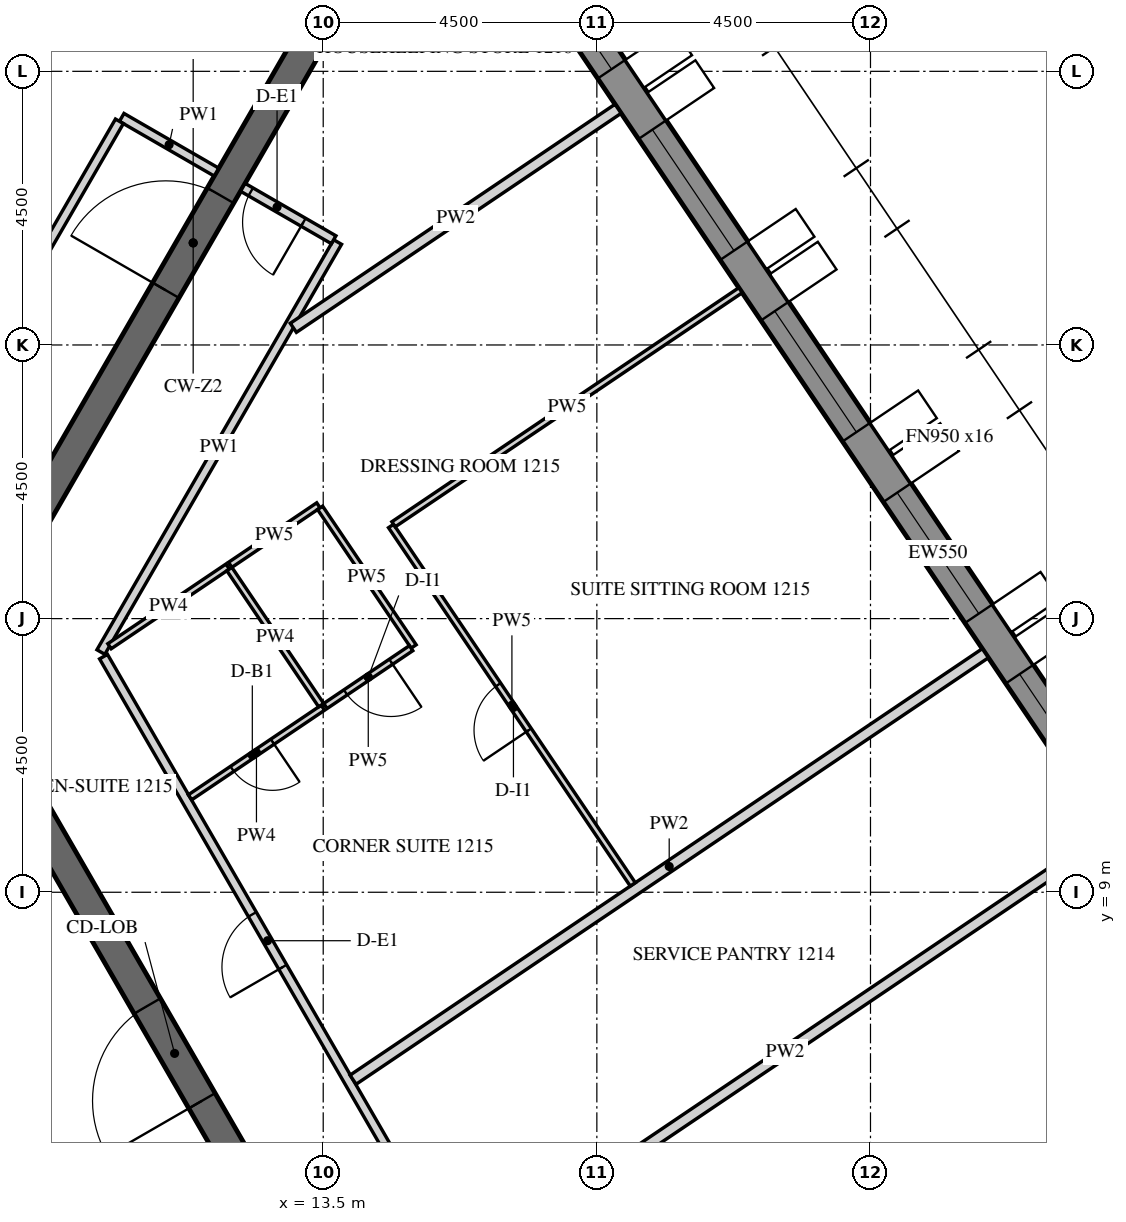
"""IFC4 building model, lengths in metres.
Left out: names, types, materials, properties, quantities, classifications, styles, units other than length and angle.
Written with IfcOpenShell. Run it as: python <this file> out.ifc"""

import sys

from ifc_helpers import new_model, si_unit, direction, frame, frame_2d, origin, place, context, subcontext, project, spatial, polyline, rectangle, outline, extrude, element, fill, save


model = new_model("IFC4")
c1 = context("Model", 3, precision=1e-05, world=origin(), true_north=direction((0.0, 1.0)))
c2 = subcontext(c1, "Body", "Model", "MODEL_VIEW")
j1 = project(units=[si_unit("LENGTHUNIT", "METRE"), si_unit("PLANEANGLEUNIT", "RADIAN")], contexts=[c1])
p1 = place(None, origin())
s1 = spatial("IfcSite", under=j1, at=p1, CompositionType="ELEMENT")
p2 = place(p1, origin())
s2 = spatial("IfcBuilding", under=s1, at=p2, CompositionType="ELEMENT")
p3 = place(p2, frame((0.0, 0.0, 164.4)))
s3 = spatial("IfcBuildingStorey", under=s2, at=p3, CompositionType="ELEMENT", Elevation=164.4)
p4 = place(p3, frame((31.371, 3.071, -0.15), z_axis=(0.0, 0.0, 1.0), x_axis=(-0.559189891278, 0.829039604297, 0.0)))
e1 = element("IfcWall", 1, at=p4, inside=s3, PredefinedType="SOLIDWALL", context=c2, shape_type="SweptSolid", body=[
    extrude(outline(polyline([(-0.026, -0.275), (27.781, -0.275), (27.736, 0.275), (0.026, 0.275), (-0.026, -0.275)])), origin(), (0.0, 0.0, 1.0), 3.9),
])
p5 = place(p4, frame((1.879, 0.0, 1.05)))
e2 = element("IfcOpeningElement", 2, at=p5, cuts=e1, PredefinedType="OPENING", context=c2, shape_type="SweptSolid", body=[
    extrude(rectangle(XDim=2.4, YDim=2.4, at=frame_2d((1.2, 1.2))), frame((0.0, 0.285, 0.0), z_axis=(0.0, -1.0, 0.0), x_axis=(1.0, 0.0, 0.0)), (0.0, 0.0, 1.0), 0.57),
])
p6 = place(p4, frame((5.479, 0.0, 1.05)))
e3 = element("IfcOpeningElement", 3, at=p6, cuts=e1, PredefinedType="OPENING", context=c2, shape_type="SweptSolid", body=[
    extrude(rectangle(XDim=2.4, YDim=2.4, at=frame_2d((1.2, 1.2))), frame((0.0, 0.285, 0.0), z_axis=(0.0, -1.0, 0.0), x_axis=(1.0, 0.0, 0.0)), (0.0, 0.0, 1.0), 0.57),
])
p7 = place(p4, frame((9.079, 0.0, 1.05)))
e4 = element("IfcOpeningElement", 4, at=p7, cuts=e1, PredefinedType="OPENING", context=c2, shape_type="SweptSolid", body=[
    extrude(rectangle(XDim=2.4, YDim=2.4, at=frame_2d((1.2, 1.2))), frame((0.0, 0.285, 0.0), z_axis=(0.0, -1.0, 0.0), x_axis=(1.0, 0.0, 0.0)), (0.0, 0.0, 1.0), 0.57),
])
p8 = place(p4, frame((12.679, 0.0, 1.05)))
e5 = element("IfcOpeningElement", 5, at=p8, cuts=e1, PredefinedType="OPENING", context=c2, shape_type="SweptSolid", body=[
    extrude(rectangle(XDim=2.4, YDim=2.4, at=frame_2d((1.2, 1.2))), frame((0.0, 0.285, 0.0), z_axis=(0.0, -1.0, 0.0), x_axis=(1.0, 0.0, 0.0)), (0.0, 0.0, 1.0), 0.57),
])
p9 = place(p4, frame((16.279, 0.0, 1.05)))
e6 = element("IfcOpeningElement", 6, at=p9, cuts=e1, PredefinedType="OPENING", context=c2, shape_type="SweptSolid", body=[
    extrude(rectangle(XDim=2.4, YDim=2.4, at=frame_2d((1.2, 1.2))), frame((0.0, 0.285, 0.0), z_axis=(0.0, -1.0, 0.0), x_axis=(1.0, 0.0, 0.0)), (0.0, 0.0, 1.0), 0.57),
])
p10 = place(p4, frame((19.879, 0.0, 1.05)))
e7 = element("IfcOpeningElement", 7, at=p10, cuts=e1, PredefinedType="OPENING", context=c2, shape_type="SweptSolid", body=[
    extrude(rectangle(XDim=2.4, YDim=2.4, at=frame_2d((1.2, 1.2))), frame((0.0, 0.285, 0.0), z_axis=(0.0, -1.0, 0.0), x_axis=(1.0, 0.0, 0.0)), (0.0, 0.0, 1.0), 0.57),
])
p11 = place(p4, frame((23.479, 0.0, 1.05)))
e8 = element("IfcOpeningElement", 8, at=p11, cuts=e1, PredefinedType="OPENING", context=c2, shape_type="SweptSolid", body=[
    extrude(rectangle(XDim=2.4, YDim=2.4, at=frame_2d((1.2, 1.2))), frame((0.0, 0.285, 0.0), z_axis=(0.0, -1.0, 0.0), x_axis=(1.0, 0.0, 0.0)), (0.0, 0.0, 1.0), 0.57),
])
p12 = place(p3, frame((14.722, 0.0, -0.15), z_axis=(0.0, 0.0, 1.0), x_axis=(-0.50000571537, 0.866022103989, 0.0)))
e9 = element("IfcWall", 9, at=p12, inside=s3, PredefinedType="SHEAR", context=c2, shape_type="SweptSolid", body=[
    extrude(outline(polyline([(-0.144, -0.25), (14.867, -0.25), (14.578, 0.25), (0.144, 0.25), (-0.144, -0.25)])), origin(), (0.0, 0.0, 1.0), 3.9),
])
p13 = place(p12, frame((6.432, 0.0, 0.15)))
e10 = element("IfcOpeningElement", 10, at=p13, cuts=e9, PredefinedType="OPENING", context=c2, shape_type="SweptSolid", body=[
    extrude(rectangle(XDim=1.8, YDim=2.4, at=frame_2d((0.9, 1.2))), frame((0.0, 0.26, 0.0), z_axis=(0.0, -1.0, 0.0), x_axis=(1.0, 0.0, 0.0)), (0.0, 0.0, 1.0), 0.52),
])
p14 = place(p3, frame((7.506, 13.0, -0.15), z_axis=(0.0, 0.0, 1.0), x_axis=(0.499988271576, 0.866032175087, 0.0)))
e11 = element("IfcWall", 11, at=p14, inside=s3, PredefinedType="SHEAR", context=c2, shape_type="SweptSolid", body=[
    extrude(rectangle(XDim=15.424, YDim=0.5, at=frame_2d((7.712, 0.0))), origin(), (0.0, 0.0, 1.0), 3.9),
])
p15 = place(p14, frame((6.812, 0.0, 0.15)))
e12 = element("IfcOpeningElement", 12, at=p15, cuts=e11, PredefinedType="OPENING", context=c2, shape_type="SweptSolid", body=[
    extrude(rectangle(XDim=1.8, YDim=2.4, at=frame_2d((0.9, 1.2))), frame((0.0, 0.26, 0.0), z_axis=(0.0, -1.0, 0.0), x_axis=(1.0, 0.0, 0.0)), (0.0, 0.0, 1.0), 0.52),
])
p16 = place(p3, frame((11.345, 0.0, -0.15), z_axis=(0.0, 0.0, 1.0), x_axis=(-0.499995046907, 0.866028263435, 0.0)))
e13 = element("IfcWall", 13, at=p16, inside=s3, PredefinedType="SHEAR", context=c2, shape_type="SweptSolid", body=[
    extrude(outline(polyline([(-0.101, -0.175), (11.446, -0.175), (11.244, 0.175), (0.101, 0.175), (-0.101, -0.175)])), origin(), (0.0, 0.0, 1.0), 3.9),
])
p17 = place(p16, frame((4.744, 0.0, 0.15)))
e14 = element("IfcOpeningElement", 14, at=p17, cuts=e13, PredefinedType="OPENING", context=c2, shape_type="SweptSolid", body=[
    extrude(rectangle(XDim=1.8, YDim=2.4, at=frame_2d((0.9, 1.2))), frame((0.0, 0.185, 0.0), z_axis=(0.0, -1.0, 0.0), x_axis=(1.0, 0.0, 0.0)), (0.0, 0.0, 1.0), 0.37),
])
p18 = place(p3, frame((11.745, 20.843, 0.0), z_axis=(0.0, 0.0, 1.0), x_axis=(-0.865989075817, 0.500062916607, 0.0)))
e15 = element("IfcWall", 15, at=p18, inside=s3, PredefinedType="PARTITIONING", context=c2, shape_type="SweptSolid", body=[
    extrude(rectangle(XDim=1.8, YDim=0.15, at=frame_2d((0.9, 0.0))), origin(), (0.0, 0.0, 1.0), 2.988),
])
p19 = place(p3, frame((10.149, 21.678, 0.0), z_axis=(0.0, 0.0, 1.0), x_axis=(-0.499993780622, -0.866028994514, 0.0)))
e16 = element("IfcWall", 16, at=p19, inside=s3, PredefinedType="PARTITIONING", context=c2, shape_type="SweptSolid", body=[
    extrude(rectangle(XDim=7.711, YDim=0.15, at=frame_2d((3.855, 0.0))), origin(), (0.0, 0.0, 1.0), 2.988),
])
p20 = place(p3, frame((17.277, 0.075, 0.0), z_axis=(0.0, 0.0, 1.0), x_axis=(-0.499988884089, 0.866031821464, 0.0)))
e17 = element("IfcWall", 17, at=p20, inside=s3, PredefinedType="PARTITIONING", context=c2, shape_type="SweptSolid", body=[
    extrude(rectangle(XDim=14.78, YDim=0.15, at=frame_2d((7.39, 0.0))), origin(), (0.0, 0.0, 1.0), 2.988),
])
p21 = place(p20, frame((4.393, 0.0, 0.0)))
e18 = element("IfcOpeningElement", 18, at=p21, cuts=e17, PredefinedType="OPENING", context=c2, shape_type="SweptSolid", body=[
    extrude(rectangle(XDim=1.0, YDim=2.1, at=frame_2d((0.5, 1.05))), frame((0.0, 0.085, 0.0), z_axis=(0.0, -1.0, 0.0), x_axis=(1.0, 0.0, 0.0)), (0.0, 0.0, 1.0), 0.17),
])
p22 = place(p20, frame((8.885, 0.0, 0.0)))
e19 = element("IfcOpeningElement", 19, at=p22, cuts=e17, PredefinedType="OPENING", context=c2, shape_type="SweptSolid", body=[
    extrude(rectangle(XDim=1.0, YDim=2.1, at=frame_2d((0.5, 1.05))), frame((0.0, 0.085, 0.0), z_axis=(0.0, -1.0, 0.0), x_axis=(1.0, 0.0, 0.0)), (0.0, 0.0, 1.0), 0.17),
])
p23 = place(p3, frame((9.844, 12.95, 0.0), z_axis=(0.0, 0.0, 1.0), x_axis=(0.500003831281, 0.866023191782, 0.0)))
e20 = element("IfcWall", 20, at=p23, inside=s3, PredefinedType="PARTITIONING", context=c2, shape_type="SweptSolid", body=[
    extrude(rectangle(XDim=7.786, YDim=0.15, at=frame_2d((3.893, 0.0))), origin(), (0.0, 0.0, 1.0), 2.988),
])
p24 = place(p3, frame((13.672, 19.73, 0.0), z_axis=(0.0, 0.0, 1.0), x_axis=(-0.866074815912, 0.499914405916, 0.0)))
e21 = element("IfcWall", 21, at=p24, inside=s3, PredefinedType="PARTITIONING", context=c2, shape_type="SweptSolid", body=[
    extrude(rectangle(XDim=1.725, YDim=0.15, at=frame_2d((0.862, 0.0))), origin(), (0.0, 0.0, 1.0), 2.988),
])
p25 = place(p24, frame((0.575, 0.0, 0.0)))
e22 = element("IfcOpeningElement", 22, at=p25, cuts=e21, PredefinedType="OPENING", context=c2, shape_type="SweptSolid", body=[
    extrude(rectangle(XDim=1.0, YDim=2.1, at=frame_2d((0.5, 1.05))), frame((0.0, 0.085, 0.0), z_axis=(0.0, -1.0, 0.0), x_axis=(1.0, 0.0, 0.0)), (0.0, 0.0, 1.0), 0.17),
])
p26 = place(p3, frame((26.402, 9.946, 0.0), z_axis=(0.0, 0.0, 1.0), x_axis=(-0.829037771727, -0.559192608187, 0.0)))
e23 = element("IfcWall", 23, at=p26, inside=s3, PredefinedType="PARTITIONING", context=c2, shape_type="SweptSolid", body=[
    extrude(rectangle(XDim=12.794, YDim=0.18, at=frame_2d((6.397, 0.0))), origin(), (0.0, 0.0, 1.0), 2.988),
])
p27 = place(p3, frame((24.389, 12.931, 0.0), z_axis=(0.0, 0.0, 1.0), x_axis=(-0.829040439793, -0.559188652593, 0.0)))
e24 = element("IfcWall", 24, at=p27, inside=s3, PredefinedType="PARTITIONING", context=c2, shape_type="SweptSolid", body=[
    extrude(rectangle(XDim=12.542, YDim=0.18, at=frame_2d((6.271, 0.0))), origin(), (0.0, 0.0, 1.0), 2.988),
])
p28 = place(p3, frame((9.986, 13.046, 0.0), z_axis=(0.0, 0.0, 1.0), x_axis=(0.829041811541, 0.559186618865, 0.0)))
e25 = element("IfcWall", 25, at=p28, inside=s3, PredefinedType="PARTITIONING", context=c2, shape_type="SweptSolid", body=[
    extrude(rectangle(XDim=2.344, YDim=0.1, at=frame_2d((1.172, 0.0))), origin(), (0.0, 0.0, 1.0), 2.988),
])
p29 = place(p3, frame((13.495, 12.035, 0.0), z_axis=(0.0, 0.0, 1.0), x_axis=(-0.829031183816, -0.55920237505, 0.0)))
e26 = element("IfcWall", 26, at=p29, inside=s3, PredefinedType="PARTITIONING", context=c2, shape_type="SweptSolid", body=[
    extrude(rectangle(XDim=2.636, YDim=0.1, at=frame_2d((1.318, 0.0))), origin(), (0.0, 0.0, 1.0), 2.988),
])
p30 = place(p29, frame((1.0, 0.0, 0.0)))
e27 = element("IfcOpeningElement", 27, at=p30, cuts=e26, PredefinedType="OPENING", context=c2, shape_type="SweptSolid", body=[
    extrude(rectangle(XDim=0.8, YDim=2.1, at=frame_2d((0.4, 1.05))), frame((0.0, 0.06, 0.0), z_axis=(0.0, -1.0, 0.0), x_axis=(1.0, 0.0, 0.0)), (0.0, 0.0, 1.0), 0.12),
])
p31 = place(p3, frame((11.97, 14.384, 0.0), z_axis=(0.0, 0.0, 1.0), x_axis=(0.828968337787, 0.559295534532, 0.0)))
e28 = element("IfcWall", 28, at=p31, inside=s3, PredefinedType="PARTITIONING", context=c2, shape_type="SweptSolid", body=[
    extrude(rectangle(XDim=1.75, YDim=0.1, at=frame_2d((0.875, 0.0))), origin(), (0.0, 0.0, 1.0), 2.988),
])
p32 = place(p3, frame((13.449, 15.322, 0.0), z_axis=(0.0, 0.0, 1.0), x_axis=(0.559158698756, -0.8290606429, 0.0)))
e29 = element("IfcWall", 29, at=p32, inside=s3, PredefinedType="PARTITIONING", context=c2, shape_type="SweptSolid", body=[
    extrude(rectangle(XDim=2.75, YDim=0.1, at=frame_2d((1.375, 0.0))), origin(), (0.0, 0.0, 1.0), 2.988),
])
p33 = place(p3, frame((14.946, 13.014, 0.0), z_axis=(0.0, 0.0, 1.0), x_axis=(-0.829033422808, -0.559199055675, 0.0)))
e30 = element("IfcWall", 30, at=p33, inside=s3, PredefinedType="PARTITIONING", context=c2, shape_type="SweptSolid", body=[
    extrude(rectangle(XDim=1.7, YDim=0.1, at=frame_2d((0.85, 0.0))), origin(), (0.0, 0.0, 1.0), 2.988),
])
p34 = place(p33, frame((0.4, 0.0, 0.0)))
e31 = element("IfcOpeningElement", 31, at=p34, cuts=e30, PredefinedType="OPENING", context=c2, shape_type="SweptSolid", body=[
    extrude(rectangle(XDim=0.9, YDim=2.1, at=frame_2d((0.45, 1.05))), frame((0.0, 0.06, 0.0), z_axis=(0.0, -1.0, 0.0), x_axis=(1.0, 0.0, 0.0)), (0.0, 0.0, 1.0), 0.12),
])
p35 = place(p3, frame((18.591, 9.129, 0.0), z_axis=(0.0, 0.0, 1.0), x_axis=(-0.559185029686, 0.829042883435, 0.0)))
e32 = element("IfcWall", 32, at=p35, inside=s3, PredefinedType="PARTITIONING", context=c2, shape_type="SweptSolid", body=[
    extrude(rectangle(XDim=7.11, YDim=0.1, at=frame_2d((3.555, 0.0))), origin(), (0.0, 0.0, 1.0), 2.988),
])
p36 = place(p35, frame((3.06, 0.0, 0.0)))
e33 = element("IfcOpeningElement", 33, at=p36, cuts=e32, PredefinedType="OPENING", context=c2, shape_type="SweptSolid", body=[
    extrude(rectangle(XDim=0.9, YDim=2.1, at=frame_2d((0.45, 1.05))), frame((0.0, 0.06, 0.0), z_axis=(0.0, -1.0, 0.0), x_axis=(1.0, 0.0, 0.0)), (0.0, 0.0, 1.0), 0.12),
])
p37 = place(p3, frame((14.657, 15.051, 0.0), z_axis=(0.0, 0.0, 1.0), x_axis=(0.829036561965, 0.559194401729, 0.0)))
e34 = element("IfcWall", 34, at=p37, inside=s3, PredefinedType="PARTITIONING", context=c2, shape_type="SweptSolid", body=[
    extrude(rectangle(XDim=6.883, YDim=0.1, at=frame_2d((3.441, 0.0))), origin(), (0.0, 0.0, 1.0), 2.988),
])
p38 = place(p3, frame((18.35, 21.884, 0.0), z_axis=(0.0, 0.0, 1.0), x_axis=(-0.829047205772, -0.559178621374, 0.0)))
e35 = element("IfcWall", 35, at=p38, inside=s3, PredefinedType="PARTITIONING", context=c2, shape_type="SweptSolid", body=[
    extrude(rectangle(XDim=6.442, YDim=0.18, at=frame_2d((3.221, 0.0))), origin(), (0.0, 0.0, 1.0), 2.988),
])
p39 = place(p3, frame((13.467, 12.077, 0.0), z_axis=(0.0, 0.0, 1.0), x_axis=(-0.559261631576, 0.828991210718, 0.0)))
e36 = element("IfcWall", 36, at=p39, inside=s3, PredefinedType="PARTITIONING", context=c2, shape_type="SweptSolid", body=[
    extrude(rectangle(XDim=2.7, YDim=0.1, at=frame_2d((1.35, 0.0))), origin(), (0.0, 0.0, 1.0), 2.988),
])
p40 = place(p7, frame((0.0, 0.205, 0.0)))
e37 = element("IfcWindow", 37, at=p40, inside=s3, PartitioningType="DOUBLE_PANEL_VERTICAL", PredefinedType="WINDOW", context=c2, shape_type="SweptSolid", body=[
    extrude(rectangle(XDim=2.4, YDim=2.4, at=frame_2d((1.2, 1.2))), frame((0.0, 0.03, 0.0), z_axis=(0.0, -1.0, 0.0), x_axis=(1.0, 0.0, 0.0)), (0.0, 0.0, 1.0), 0.06),
])
fill(e4, e37)
p41 = place(p8, frame((0.0, 0.205, 0.0)))
e38 = element("IfcWindow", 38, at=p41, inside=s3, PartitioningType="DOUBLE_PANEL_VERTICAL", PredefinedType="WINDOW", context=c2, shape_type="SweptSolid", body=[
    extrude(rectangle(XDim=2.4, YDim=2.4, at=frame_2d((1.2, 1.2))), frame((0.0, 0.03, 0.0), z_axis=(0.0, -1.0, 0.0), x_axis=(1.0, 0.0, 0.0)), (0.0, 0.0, 1.0), 0.06),
])
fill(e5, e38)
p42 = place(p9, frame((0.0, 0.205, 0.0)))
e39 = element("IfcWindow", 39, at=p42, inside=s3, PartitioningType="DOUBLE_PANEL_VERTICAL", PredefinedType="WINDOW", context=c2, shape_type="SweptSolid", body=[
    extrude(rectangle(XDim=2.4, YDim=2.4, at=frame_2d((1.2, 1.2))), frame((0.0, 0.03, 0.0), z_axis=(0.0, -1.0, 0.0), x_axis=(1.0, 0.0, 0.0)), (0.0, 0.0, 1.0), 0.06),
])
fill(e6, e39)
p43 = place(p10, frame((0.0, 0.205, 0.0)))
e40 = element("IfcWindow", 40, at=p43, inside=s3, PartitioningType="DOUBLE_PANEL_VERTICAL", PredefinedType="WINDOW", context=c2, shape_type="SweptSolid", body=[
    extrude(rectangle(XDim=2.4, YDim=2.4, at=frame_2d((1.2, 1.2))), frame((0.0, 0.03, 0.0), z_axis=(0.0, -1.0, 0.0), x_axis=(1.0, 0.0, 0.0)), (0.0, 0.0, 1.0), 0.06),
])
fill(e7, e40)
p44 = place(p11, frame((0.0, 0.205, 0.0)))
e41 = element("IfcWindow", 41, at=p44, inside=s3, PartitioningType="DOUBLE_PANEL_VERTICAL", PredefinedType="WINDOW", context=c2, shape_type="SweptSolid", body=[
    extrude(rectangle(XDim=2.4, YDim=2.4, at=frame_2d((1.2, 1.2))), frame((0.0, 0.03, 0.0), z_axis=(0.0, -1.0, 0.0), x_axis=(1.0, 0.0, 0.0)), (0.0, 0.0, 1.0), 0.06),
])
fill(e8, e41)
p45 = place(p13, origin())
e42 = element("IfcDoor", 42, at=p45, inside=s3, OperationType="DOUBLE_DOOR_SINGLE_SWING", PredefinedType="DOOR", context=c2, shape_type="SweptSolid", body=[
    extrude(rectangle(XDim=1.8, YDim=2.4, at=frame_2d((0.9, 1.2))), frame((0.0, 0.025, 0.0), z_axis=(0.0, -1.0, 0.0), x_axis=(1.0, 0.0, 0.0)), (0.0, 0.0, 1.0), 0.05),
])
fill(e10, e42)
p46 = place(p15, origin())
e43 = element("IfcDoor", 43, at=p46, inside=s3, OperationType="DOUBLE_DOOR_SINGLE_SWING", PredefinedType="DOOR", context=c2, shape_type="SweptSolid", body=[
    extrude(rectangle(XDim=1.8, YDim=2.4, at=frame_2d((0.9, 1.2))), frame((0.0, 0.025, 0.0), z_axis=(0.0, -1.0, 0.0), x_axis=(1.0, 0.0, 0.0)), (0.0, 0.0, 1.0), 0.05),
])
fill(e12, e43)
p47 = place(p22, origin())
e44 = element("IfcDoor", 44, at=p47, inside=s3, OperationType="SINGLE_SWING_RIGHT", PredefinedType="DOOR", context=c2, shape_type="SweptSolid", body=[
    extrude(rectangle(XDim=1.0, YDim=2.1, at=frame_2d((0.5, 1.05))), frame((0.0, 0.025, 0.0), z_axis=(0.0, -1.0, 0.0), x_axis=(1.0, 0.0, 0.0)), (0.0, 0.0, 1.0), 0.05),
])
fill(e19, e44)
p48 = place(p30, origin())
e45 = element("IfcDoor", 45, at=p48, inside=s3, OperationType="SINGLE_SWING_LEFT", PredefinedType="DOOR", context=c2, shape_type="SweptSolid", body=[
    extrude(rectangle(XDim=0.8, YDim=2.1, at=frame_2d((0.4, 1.05))), frame((0.0, 0.025, 0.0), z_axis=(0.0, -1.0, 0.0), x_axis=(1.0, 0.0, 0.0)), (0.0, 0.0, 1.0), 0.05),
])
fill(e27, e45)
p49 = place(p34, origin())
e46 = element("IfcDoor", 46, at=p49, inside=s3, OperationType="SINGLE_SWING_RIGHT", PredefinedType="DOOR", context=c2, shape_type="SweptSolid", body=[
    extrude(rectangle(XDim=0.9, YDim=2.1, at=frame_2d((0.45, 1.05))), frame((0.0, 0.025, 0.0), z_axis=(0.0, -1.0, 0.0), x_axis=(1.0, 0.0, 0.0)), (0.0, 0.0, 1.0), 0.05),
])
fill(e31, e46)
p50 = place(p36, origin())
e47 = element("IfcDoor", 47, at=p50, inside=s3, OperationType="SINGLE_SWING_RIGHT", PredefinedType="DOOR", context=c2, shape_type="SweptSolid", body=[
    extrude(rectangle(XDim=0.9, YDim=2.1, at=frame_2d((0.45, 1.05))), frame((0.0, 0.025, 0.0), z_axis=(0.0, -1.0, 0.0), x_axis=(1.0, 0.0, 0.0)), (0.0, 0.0, 1.0), 0.05),
])
fill(e33, e47)
p51 = place(p25, origin())
e48 = element("IfcDoor", 48, at=p51, inside=s3, OperationType="SINGLE_SWING_LEFT", PredefinedType="DOOR", context=c2, shape_type="SweptSolid", body=[
    extrude(rectangle(XDim=1.0, YDim=2.1, at=frame_2d((0.5, 1.05))), frame((0.0, 0.025, 0.0), z_axis=(0.0, -1.0, 0.0), x_axis=(1.0, 0.0, 0.0)), (0.0, 0.0, 1.0), 0.05),
])
fill(e22, e48)
save(model, sys.argv[1])
